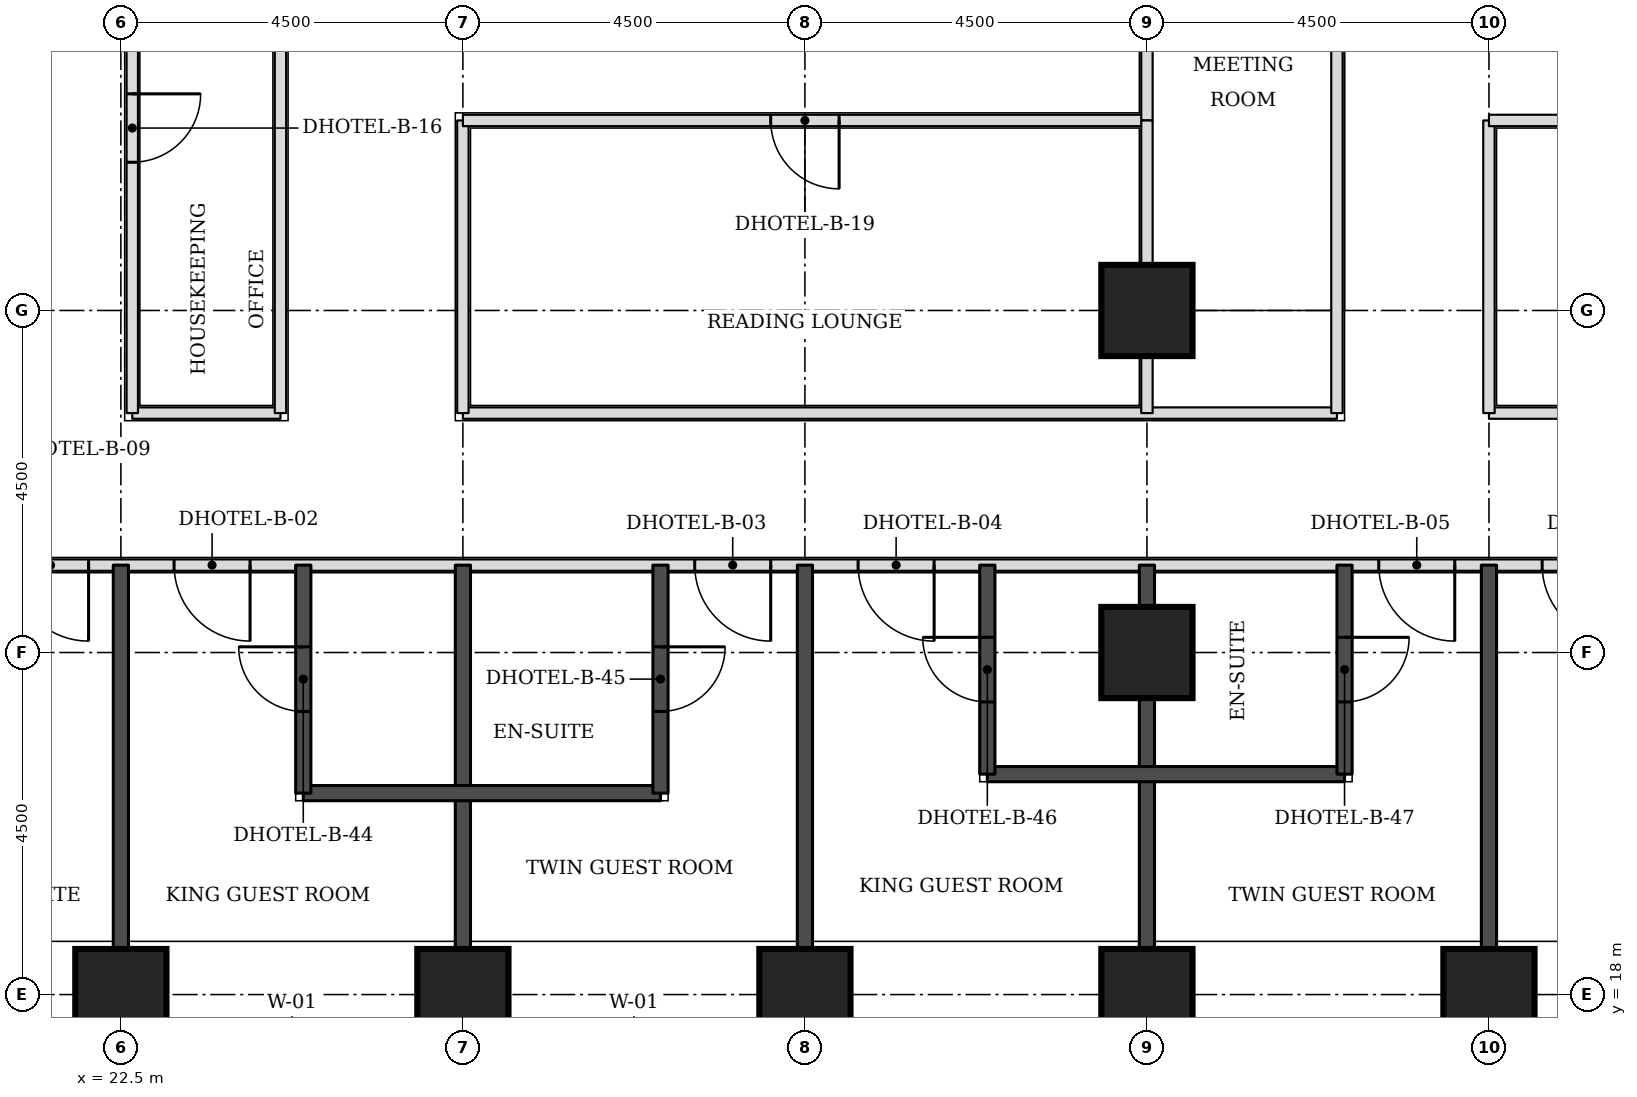
"""IFC4 building model, lengths in metres.
Left out: names, types, materials, properties, quantities, classifications, styles, units other than length and angle.
Written with IfcOpenShell. Run it as: python <this file> out.ifc"""

import sys

from ifc_helpers import new_model, si_unit, direction, frame, frame_2d, origin, origin_2d, place, context, subcontext, project, spatial, rectangle, extrude, element, fill, save


model = new_model("IFC4")
c1 = context("Model", 3, precision=1e-05, world=origin(), true_north=direction((0.0, 1.0)))
c2 = subcontext(c1, "Body", "Model", "MODEL_VIEW")
j1 = project(units=[si_unit("LENGTHUNIT", "METRE"), si_unit("PLANEANGLEUNIT", "RADIAN")], contexts=[c1])
p1 = place(None, origin())
s1 = spatial("IfcSite", under=j1, at=p1, CompositionType="ELEMENT")
p2 = place(p1, origin())
s2 = spatial("IfcBuilding", under=s1, at=p2, CompositionType="ELEMENT")
p3 = place(p2, frame((0.0, 0.0, 29.7)))
s3 = spatial("IfcBuildingStorey", under=s2, at=p3, CompositionType="ELEMENT", Elevation=29.7)
for number, where, z_axis, x_axis in (
    (1, (22.5, 18.0, 0.0), (0.0, 0.0, 1.0), (1.0, 0.0, 0.0)),
    (2, (27.0, 18.0, 0.0), (0.0, 0.0, 1.0), (1.0, 0.0, 0.0)),
    (3, (31.5, 18.0, 0.0), (0.0, 0.0, 1.0), (1.0, 0.0, 0.0)),
    (4, (36.0, 18.0, 0.0), (0.0, 0.0, 1.0), (1.0, 0.0, 0.0)),
    (5, (40.5, 18.0, 0.0), (0.0, 0.0, 1.0), (1.0, 0.0, 0.0)),
    (6, (36.0, 22.5, 0.0), (0.0, 0.0, 1.0), (1.0, 0.0, 0.0)),
    (7, (36.0, 27.0, 0.0), (0.0, 0.0, 1.0), (1.0, 0.0, 0.0)),
):
    element("IfcColumn", number, at=place(p3, frame(where, z_axis=z_axis, x_axis=x_axis)), inside=s3, PredefinedType="COLUMN", context=c2, shape_type="SweptSolid", body=[
        extrude(rectangle(XDim=1.2, YDim=1.2, at=origin_2d()), origin(), (0.0, 0.0, 1.0), 3.3),
    ])
p4 = place(p3, frame((20.65, 23.65, 0.0), z_axis=(0.0, 0.0, 1.0), x_axis=(1.0, 0.0, 0.0)))
e8 = element("IfcWall", 8, at=p4, inside=s3, PredefinedType="PARTITIONING", context=c2, shape_type="SweptSolid", body=[
    extrude(rectangle(XDim=32.2, YDim=0.15, at=frame_2d((16.1, 0.0))), origin(), (0.0, 0.0, 1.0), 3.08),
])
p5 = place(p4, frame((2.55, 0.0, 0.0)))
e9 = element("IfcOpeningElement", 9, at=p5, cuts=e8, PredefinedType="OPENING", context=c2, shape_type="SweptSolid", body=[
    extrude(rectangle(XDim=1.0, YDim=2.1, at=frame_2d((0.5, 1.05))), frame((0.0, 0.085, 0.0), z_axis=(0.0, -1.0, 0.0), x_axis=(1.0, 0.0, 0.0)), (0.0, 0.0, 1.0), 0.17),
])
p6 = place(p4, frame((9.4, 0.0, 0.0)))
e10 = element("IfcOpeningElement", 10, at=p6, cuts=e8, PredefinedType="OPENING", context=c2, shape_type="SweptSolid", body=[
    extrude(rectangle(XDim=1.0, YDim=2.1, at=frame_2d((0.5, 1.05))), frame((0.0, 0.085, 0.0), z_axis=(0.0, -1.0, 0.0), x_axis=(1.0, 0.0, 0.0)), (0.0, 0.0, 1.0), 0.17),
])
p7 = place(p4, frame((11.55, 0.0, 0.0)))
e11 = element("IfcOpeningElement", 11, at=p7, cuts=e8, PredefinedType="OPENING", context=c2, shape_type="SweptSolid", body=[
    extrude(rectangle(XDim=1.0, YDim=2.1, at=frame_2d((0.5, 1.05))), frame((0.0, 0.085, 0.0), z_axis=(0.0, -1.0, 0.0), x_axis=(1.0, 0.0, 0.0)), (0.0, 0.0, 1.0), 0.17),
])
p8 = place(p4, frame((18.4, 0.0, 0.0)))
e12 = element("IfcOpeningElement", 12, at=p8, cuts=e8, PredefinedType="OPENING", context=c2, shape_type="SweptSolid", body=[
    extrude(rectangle(XDim=1.0, YDim=2.1, at=frame_2d((0.5, 1.05))), frame((0.0, 0.085, 0.0), z_axis=(0.0, -1.0, 0.0), x_axis=(1.0, 0.0, 0.0)), (0.0, 0.0, 1.0), 0.17),
])
p9 = place(p4, frame((20.55, 0.0, 0.0)))
e13 = element("IfcOpeningElement", 13, at=p9, cuts=e8, PredefinedType="OPENING", context=c2, shape_type="SweptSolid", body=[
    extrude(rectangle(XDim=1.0, YDim=2.1, at=frame_2d((0.5, 1.05))), frame((0.0, 0.085, 0.0), z_axis=(0.0, -1.0, 0.0), x_axis=(1.0, 0.0, 0.0)), (0.0, 0.0, 1.0), 0.17),
])
p10 = place(p4, frame((27.4, 0.0, 0.0)))
e14 = element("IfcOpeningElement", 14, at=p10, cuts=e8, PredefinedType="OPENING", context=c2, shape_type="SweptSolid", body=[
    extrude(rectangle(XDim=1.0, YDim=2.1, at=frame_2d((0.5, 1.05))), frame((0.0, 0.085, 0.0), z_axis=(0.0, -1.0, 0.0), x_axis=(1.0, 0.0, 0.0)), (0.0, 0.0, 1.0), 0.17),
])
p11 = place(p4, frame((0.425, 0.0, 0.0)))
e15 = element("IfcOpeningElement", 15, at=p11, cuts=e8, PredefinedType="OPENING", context=c2, shape_type="SweptSolid", body=[
    extrude(rectangle(XDim=1.0, YDim=2.1, at=frame_2d((0.5, 1.05))), frame((0.0, 0.085, 0.0), z_axis=(0.0, -1.0, 0.0), x_axis=(1.0, 0.0, 0.0)), (0.0, 0.0, 1.0), 0.17),
])
p12 = place(p4, frame((30.025, 0.0, 0.0)))
e16 = element("IfcOpeningElement", 16, at=p12, cuts=e8, PredefinedType="OPENING", context=c2, shape_type="SweptSolid", body=[
    extrude(rectangle(XDim=1.0, YDim=2.1, at=frame_2d((0.5, 1.05))), frame((0.0, 0.085, 0.0), z_axis=(0.0, -1.0, 0.0), x_axis=(1.0, 0.0, 0.0)), (0.0, 0.0, 1.0), 0.17),
])
p13 = place(p3, frame((22.65, 25.65, 0.0), z_axis=(0.0, 0.0, 1.0), x_axis=(1.0, 0.0, 0.0)))
e17 = element("IfcWall", 17, at=p13, inside=s3, PredefinedType="PARTITIONING", context=c2, shape_type="SweptSolid", body=[
    extrude(rectangle(XDim=1.95, YDim=0.15, at=frame_2d((0.975, 0.0))), origin(), (0.0, 0.0, 1.0), 3.08),
])
p14 = place(p3, frame((22.65, 25.65, 0.0), z_axis=(0.0, 0.0, 1.0), x_axis=(0.0, 1.0, 0.0)))
e18 = element("IfcWall", 18, at=p14, inside=s3, PredefinedType="PARTITIONING", context=c2, shape_type="SweptSolid", body=[
    extrude(rectangle(XDim=17.35, YDim=0.15, at=frame_2d((8.675, 0.0))), origin(), (0.0, 0.0, 1.0), 3.08),
])
p15 = place(p14, frame((3.3, 0.0, 0.0)))
e19 = element("IfcOpeningElement", 19, at=p15, cuts=e18, PredefinedType="OPENING", context=c2, shape_type="SweptSolid", body=[
    extrude(rectangle(XDim=0.9, YDim=2.1, at=frame_2d((0.45, 1.05))), frame((0.0, 0.085, 0.0), z_axis=(0.0, -1.0, 0.0), x_axis=(1.0, 0.0, 0.0)), (0.0, 0.0, 1.0), 0.17),
])
p16 = place(p14, frame((10.725, 0.0, 0.0)))
e20 = element("IfcOpeningElement", 20, at=p16, cuts=e18, PredefinedType="OPENING", context=c2, shape_type="SweptSolid", body=[
    extrude(rectangle(XDim=0.9, YDim=2.1, at=frame_2d((0.45, 1.05))), frame((0.0, 0.085, 0.0), z_axis=(0.0, -1.0, 0.0), x_axis=(1.0, 0.0, 0.0)), (0.0, 0.0, 1.0), 0.17),
])
p17 = place(p3, frame((24.6, 25.65, 0.0), z_axis=(0.0, 0.0, 1.0), x_axis=(0.0, 1.0, 0.0)))
e21 = element("IfcWall", 21, at=p17, inside=s3, PredefinedType="PARTITIONING", context=c2, shape_type="SweptSolid", body=[
    extrude(rectangle(XDim=14.85, YDim=0.15, at=frame_2d((7.425, 0.0))), origin(), (0.0, 0.0, 1.0), 3.08),
])
p18 = place(p3, frame((27.0, 25.65, 0.0), z_axis=(0.0, 0.0, 1.0), x_axis=(1.0, 0.0, 0.0)))
e22 = element("IfcWall", 22, at=p18, inside=s3, PredefinedType="PARTITIONING", context=c2, shape_type="SweptSolid", body=[
    extrude(rectangle(XDim=11.5, YDim=0.15, at=frame_2d((5.75, 0.0))), origin(), (0.0, 0.0, 1.0), 3.08),
])
p19 = place(p3, frame((27.0, 25.65, 0.0), z_axis=(0.0, 0.0, 1.0), x_axis=(0.0, 1.0, 0.0)))
e23 = element("IfcWall", 23, at=p19, inside=s3, PredefinedType="PARTITIONING", context=c2, shape_type="SweptSolid", body=[
    extrude(rectangle(XDim=3.85, YDim=0.15, at=frame_2d((1.925, 0.0))), origin(), (0.0, 0.0, 1.0), 3.08),
])
p20 = place(p3, frame((38.5, 25.65, 0.0), z_axis=(0.0, 0.0, 1.0), x_axis=(0.0, 1.0, 0.0)))
e24 = element("IfcWall", 24, at=p20, inside=s3, PredefinedType="PARTITIONING", context=c2, shape_type="SweptSolid", body=[
    extrude(rectangle(XDim=14.85, YDim=0.15, at=frame_2d((7.425, 0.0))), origin(), (0.0, 0.0, 1.0), 3.08),
])
p21 = place(p20, frame((7.54, 0.0, 0.0)))
e25 = element("IfcOpeningElement", 25, at=p21, cuts=e24, PredefinedType="OPENING", context=c2, shape_type="SweptSolid", body=[
    extrude(rectangle(XDim=0.9, YDim=2.1, at=frame_2d((0.45, 1.05))), frame((0.0, 0.085, 0.0), z_axis=(0.0, -1.0, 0.0), x_axis=(1.0, 0.0, 0.0)), (0.0, 0.0, 1.0), 0.17),
])
p22 = place(p3, frame((40.5, 25.65, 0.0), z_axis=(0.0, 0.0, 1.0), x_axis=(1.0, 0.0, 0.0)))
e26 = element("IfcWall", 26, at=p22, inside=s3, PredefinedType="PARTITIONING", context=c2, shape_type="SweptSolid", body=[
    extrude(rectangle(XDim=10.35, YDim=0.15, at=frame_2d((5.175, 0.0))), origin(), (0.0, 0.0, 1.0), 3.08),
])
p23 = place(p3, frame((40.5, 25.65, 0.0), z_axis=(0.0, 0.0, 1.0), x_axis=(0.0, 1.0, 0.0)))
e27 = element("IfcWall", 27, at=p23, inside=s3, PredefinedType="PARTITIONING", context=c2, shape_type="SweptSolid", body=[
    extrude(rectangle(XDim=3.85, YDim=0.15, at=frame_2d((1.925, 0.0))), origin(), (0.0, 0.0, 1.0), 3.08),
])
p24 = place(p3, frame((27.0, 29.5, 0.0), z_axis=(0.0, 0.0, 1.0), x_axis=(1.0, 0.0, 0.0)))
e28 = element("IfcWall", 28, at=p24, inside=s3, PredefinedType="PARTITIONING", context=c2, shape_type="SweptSolid", body=[
    extrude(rectangle(XDim=9.0, YDim=0.15, at=frame_2d((4.5, 0.0))), origin(), (0.0, 0.0, 1.0), 3.08),
])
p25 = place(p24, frame((4.05, 0.0, 0.0)))
e29 = element("IfcOpeningElement", 29, at=p25, cuts=e28, PredefinedType="OPENING", context=c2, shape_type="SweptSolid", body=[
    extrude(rectangle(XDim=0.9, YDim=2.1, at=frame_2d((0.45, 1.05))), frame((0.0, 0.085, 0.0), z_axis=(0.0, -1.0, 0.0), x_axis=(1.0, 0.0, 0.0)), (0.0, 0.0, 1.0), 0.17),
])
p26 = place(p3, frame((36.0, 29.5, 0.0), z_axis=(0.0, 0.0, 1.0), x_axis=(0.0, 1.0, 0.0)))
e30 = element("IfcWall", 30, at=p26, inside=s3, PredefinedType="PARTITIONING", context=c2, shape_type="SweptSolid", body=[
    extrude(rectangle(XDim=1.95, YDim=0.15, at=frame_2d((0.975, 0.0))), origin(), (0.0, 0.0, 1.0), 2.33),
])
p27 = place(p3, frame((40.5, 29.5, 0.0), z_axis=(0.0, 0.0, 1.0), x_axis=(1.0, 0.0, 0.0)))
e31 = element("IfcWall", 31, at=p27, inside=s3, PredefinedType="PARTITIONING", context=c2, shape_type="SweptSolid", body=[
    extrude(rectangle(XDim=10.35, YDim=0.15, at=frame_2d((5.175, 0.0))), origin(), (0.0, 0.0, 1.0), 3.08),
])
p28 = place(p27, frame((4.725, 0.0, 0.0)))
e32 = element("IfcOpeningElement", 32, at=p28, cuts=e31, PredefinedType="OPENING", context=c2, shape_type="SweptSolid", body=[
    extrude(rectangle(XDim=0.9, YDim=2.1, at=frame_2d((0.45, 1.05))), frame((0.0, 0.085, 0.0), z_axis=(0.0, -1.0, 0.0), x_axis=(1.0, 0.0, 0.0)), (0.0, 0.0, 1.0), 0.17),
])
for number, where, z_axis, x_axis in (
    (33, (22.5, 18.6, 0.0), (0.0, 0.0, 1.0), (0.0, 1.0, 0.0)),
    (34, (27.0, 18.6, 0.0), (0.0, 0.0, 1.0), (0.0, 1.0, 0.0)),
    (35, (31.5, 18.6, 0.0), (0.0, 0.0, 1.0), (0.0, 1.0, 0.0)),
    (36, (36.0, 18.6, 0.0), (0.0, 0.0, 1.0), (0.0, 1.0, 0.0)),
    (37, (40.5, 18.6, 0.0), (0.0, 0.0, 1.0), (0.0, 1.0, 0.0)),
):
    element("IfcWall", number, at=place(p3, frame(where, z_axis=z_axis, x_axis=x_axis)), inside=s3, PredefinedType="SOLIDWALL", context=c2, shape_type="SweptSolid", body=[
        extrude(rectangle(XDim=5.05, YDim=0.2, at=frame_2d((2.525, 0.0))), origin(), (0.0, 0.0, 1.0), 3.08),
    ])
p29 = place(p3, frame((24.9, 20.65, 0.0), z_axis=(0.0, 0.0, 1.0), x_axis=(1.0, 0.0, 0.0)))
e38 = element("IfcWall", 38, at=p29, inside=s3, PredefinedType="SOLIDWALL", context=c2, shape_type="SweptSolid", body=[
    extrude(rectangle(XDim=4.7, YDim=0.2, at=frame_2d((2.35, 0.0))), origin(), (0.0, 0.0, 1.0), 3.08),
])
p30 = place(p3, frame((24.9, 20.65, 0.0), z_axis=(0.0, 0.0, 1.0), x_axis=(0.0, 1.0, 0.0)))
e39 = element("IfcWall", 39, at=p30, inside=s3, PredefinedType="SOLIDWALL", context=c2, shape_type="SweptSolid", body=[
    extrude(rectangle(XDim=3.0, YDim=0.2, at=frame_2d((1.5, 0.0))), origin(), (0.0, 0.0, 1.0), 3.08),
])
p31 = place(p30, frame((1.075, 0.0, 0.0)))
e40 = element("IfcOpeningElement", 40, at=p31, cuts=e39, PredefinedType="OPENING", context=c2, shape_type="SweptSolid", body=[
    extrude(rectangle(XDim=0.85, YDim=2.1, at=frame_2d((0.425, 1.05))), frame((0.0, 0.11, 0.0), z_axis=(0.0, -1.0, 0.0), x_axis=(1.0, 0.0, 0.0)), (0.0, 0.0, 1.0), 0.22),
])
p32 = place(p3, frame((29.6, 20.65, 0.0), z_axis=(0.0, 0.0, 1.0), x_axis=(0.0, 1.0, 0.0)))
e41 = element("IfcWall", 41, at=p32, inside=s3, PredefinedType="SOLIDWALL", context=c2, shape_type="SweptSolid", body=[
    extrude(rectangle(XDim=3.0, YDim=0.2, at=frame_2d((1.5, 0.0))), origin(), (0.0, 0.0, 1.0), 3.08),
])
p33 = place(p32, frame((1.075, 0.0, 0.0)))
e42 = element("IfcOpeningElement", 42, at=p33, cuts=e41, PredefinedType="OPENING", context=c2, shape_type="SweptSolid", body=[
    extrude(rectangle(XDim=0.85, YDim=2.1, at=frame_2d((0.425, 1.05))), frame((0.0, 0.11, 0.0), z_axis=(0.0, -1.0, 0.0), x_axis=(1.0, 0.0, 0.0)), (0.0, 0.0, 1.0), 0.22),
])
p34 = place(p3, frame((33.9, 20.9, 0.0), z_axis=(0.0, 0.0, 1.0), x_axis=(1.0, 0.0, 0.0)))
e43 = element("IfcWall", 43, at=p34, inside=s3, PredefinedType="SOLIDWALL", context=c2, shape_type="SweptSolid", body=[
    extrude(rectangle(XDim=4.7, YDim=0.2, at=frame_2d((2.35, 0.0))), origin(), (0.0, 0.0, 1.0), 3.08),
])
p35 = place(p3, frame((33.9, 20.9, 0.0), z_axis=(0.0, 0.0, 1.0), x_axis=(0.0, 1.0, 0.0)))
e44 = element("IfcWall", 44, at=p35, inside=s3, PredefinedType="SOLIDWALL", context=c2, shape_type="SweptSolid", body=[
    extrude(rectangle(XDim=2.75, YDim=0.2, at=frame_2d((1.375, 0.0))), origin(), (0.0, 0.0, 1.0), 3.08),
])
p36 = place(p35, frame((0.95, 0.0, 0.0)))
e45 = element("IfcOpeningElement", 45, at=p36, cuts=e44, PredefinedType="OPENING", context=c2, shape_type="SweptSolid", body=[
    extrude(rectangle(XDim=0.85, YDim=2.1, at=frame_2d((0.425, 1.05))), frame((0.0, 0.11, 0.0), z_axis=(0.0, -1.0, 0.0), x_axis=(1.0, 0.0, 0.0)), (0.0, 0.0, 1.0), 0.22),
])
p37 = place(p3, frame((38.6, 20.9, 0.0), z_axis=(0.0, 0.0, 1.0), x_axis=(0.0, 1.0, 0.0)))
e46 = element("IfcWall", 46, at=p37, inside=s3, PredefinedType="SOLIDWALL", context=c2, shape_type="SweptSolid", body=[
    extrude(rectangle(XDim=2.75, YDim=0.2, at=frame_2d((1.375, 0.0))), origin(), (0.0, 0.0, 1.0), 3.08),
])
p38 = place(p37, frame((0.95, 0.0, 0.0)))
e47 = element("IfcOpeningElement", 47, at=p38, cuts=e46, PredefinedType="OPENING", context=c2, shape_type="SweptSolid", body=[
    extrude(rectangle(XDim=0.85, YDim=2.1, at=frame_2d((0.425, 1.05))), frame((0.0, 0.11, 0.0), z_axis=(0.0, -1.0, 0.0), x_axis=(1.0, 0.0, 0.0)), (0.0, 0.0, 1.0), 0.22),
])
p39 = place(p3, frame((36.0, 25.65, 0.0), z_axis=(0.0, 0.0, 1.0), x_axis=(0.0, 1.0, 0.0)))
e48 = element("IfcWall", 48, at=p39, inside=s3, PredefinedType="PARTITIONING", context=c2, shape_type="SweptSolid", body=[
    extrude(rectangle(XDim=3.85, YDim=0.15, at=frame_2d((1.925, 0.0))), origin(), (0.0, 0.0, 1.0), 2.33),
])
p40 = place(p5, frame((1.0, 0.0, 0.0), z_axis=(0.0, 0.0, 1.0), x_axis=(-1.0, 0.0, 0.0)))
e49 = element("IfcDoor", 49, at=p40, inside=s3, OperationType="SINGLE_SWING_LEFT", PredefinedType="DOOR", context=c2, shape_type="SweptSolid", body=[
    extrude(rectangle(XDim=1.0, YDim=2.1, at=frame_2d((0.5, 1.05))), frame((0.0, 0.025, 0.0), z_axis=(0.0, -1.0, 0.0), x_axis=(1.0, 0.0, 0.0)), (0.0, 0.0, 1.0), 0.05),
])
fill(e9, e49)
p41 = place(p31, origin())
e50 = element("IfcDoor", 50, at=p41, inside=s3, OperationType="SINGLE_SWING_RIGHT", PredefinedType="DOOR", context=c2, shape_type="SweptSolid", body=[
    extrude(rectangle(XDim=0.85, YDim=2.1, at=frame_2d((0.425, 1.05))), frame((0.0, 0.025, 0.0), z_axis=(0.0, -1.0, 0.0), x_axis=(1.0, 0.0, 0.0)), (0.0, 0.0, 1.0), 0.05),
])
fill(e40, e50)
p42 = place(p6, frame((1.0, 0.0, 0.0), z_axis=(0.0, 0.0, 1.0), x_axis=(-1.0, 0.0, 0.0)))
e51 = element("IfcDoor", 51, at=p42, inside=s3, OperationType="SINGLE_SWING_LEFT", PredefinedType="DOOR", context=c2, shape_type="SweptSolid", body=[
    extrude(rectangle(XDim=1.0, YDim=2.1, at=frame_2d((0.5, 1.05))), frame((0.0, 0.025, 0.0), z_axis=(0.0, -1.0, 0.0), x_axis=(1.0, 0.0, 0.0)), (0.0, 0.0, 1.0), 0.05),
])
fill(e10, e51)
p43 = place(p33, frame((0.85, 0.0, 0.0), z_axis=(0.0, 0.0, 1.0), x_axis=(-1.0, 0.0, 0.0)))
e52 = element("IfcDoor", 52, at=p43, inside=s3, OperationType="SINGLE_SWING_LEFT", PredefinedType="DOOR", context=c2, shape_type="SweptSolid", body=[
    extrude(rectangle(XDim=0.85, YDim=2.1, at=frame_2d((0.425, 1.05))), frame((0.0, 0.025, 0.0), z_axis=(0.0, -1.0, 0.0), x_axis=(1.0, 0.0, 0.0)), (0.0, 0.0, 1.0), 0.05),
])
fill(e42, e52)
p44 = place(p7, frame((1.0, 0.0, 0.0), z_axis=(0.0, 0.0, 1.0), x_axis=(-1.0, 0.0, 0.0)))
e53 = element("IfcDoor", 53, at=p44, inside=s3, OperationType="SINGLE_SWING_LEFT", PredefinedType="DOOR", context=c2, shape_type="SweptSolid", body=[
    extrude(rectangle(XDim=1.0, YDim=2.1, at=frame_2d((0.5, 1.05))), frame((0.0, 0.025, 0.0), z_axis=(0.0, -1.0, 0.0), x_axis=(1.0, 0.0, 0.0)), (0.0, 0.0, 1.0), 0.05),
])
fill(e11, e53)
p45 = place(p36, origin())
e54 = element("IfcDoor", 54, at=p45, inside=s3, OperationType="SINGLE_SWING_RIGHT", PredefinedType="DOOR", context=c2, shape_type="SweptSolid", body=[
    extrude(rectangle(XDim=0.85, YDim=2.1, at=frame_2d((0.425, 1.05))), frame((0.0, 0.025, 0.0), z_axis=(0.0, -1.0, 0.0), x_axis=(1.0, 0.0, 0.0)), (0.0, 0.0, 1.0), 0.05),
])
fill(e45, e54)
p46 = place(p8, frame((1.0, 0.0, 0.0), z_axis=(0.0, 0.0, 1.0), x_axis=(-1.0, 0.0, 0.0)))
e55 = element("IfcDoor", 55, at=p46, inside=s3, OperationType="SINGLE_SWING_LEFT", PredefinedType="DOOR", context=c2, shape_type="SweptSolid", body=[
    extrude(rectangle(XDim=1.0, YDim=2.1, at=frame_2d((0.5, 1.05))), frame((0.0, 0.025, 0.0), z_axis=(0.0, -1.0, 0.0), x_axis=(1.0, 0.0, 0.0)), (0.0, 0.0, 1.0), 0.05),
])
fill(e12, e55)
p47 = place(p38, frame((0.85, 0.0, 0.0), z_axis=(0.0, 0.0, 1.0), x_axis=(-1.0, 0.0, 0.0)))
e56 = element("IfcDoor", 56, at=p47, inside=s3, OperationType="SINGLE_SWING_LEFT", PredefinedType="DOOR", context=c2, shape_type="SweptSolid", body=[
    extrude(rectangle(XDim=0.85, YDim=2.1, at=frame_2d((0.425, 1.05))), frame((0.0, 0.025, 0.0), z_axis=(0.0, -1.0, 0.0), x_axis=(1.0, 0.0, 0.0)), (0.0, 0.0, 1.0), 0.05),
])
fill(e47, e56)
p48 = place(p9, frame((1.0, 0.0, 0.0), z_axis=(0.0, 0.0, 1.0), x_axis=(-1.0, 0.0, 0.0)))
e57 = element("IfcDoor", 57, at=p48, inside=s3, OperationType="SINGLE_SWING_LEFT", PredefinedType="DOOR", context=c2, shape_type="SweptSolid", body=[
    extrude(rectangle(XDim=1.0, YDim=2.1, at=frame_2d((0.5, 1.05))), frame((0.0, 0.025, 0.0), z_axis=(0.0, -1.0, 0.0), x_axis=(1.0, 0.0, 0.0)), (0.0, 0.0, 1.0), 0.05),
])
fill(e13, e57)
p49 = place(p11, frame((1.0, 0.0, 0.0), z_axis=(0.0, 0.0, 1.0), x_axis=(-1.0, 0.0, 0.0)))
e58 = element("IfcDoor", 58, at=p49, inside=s3, OperationType="SINGLE_SWING_LEFT", PredefinedType="DOOR", context=c2, shape_type="SweptSolid", body=[
    extrude(rectangle(XDim=1.0, YDim=2.1, at=frame_2d((0.5, 1.05))), frame((0.0, 0.025, 0.0), z_axis=(0.0, -1.0, 0.0), x_axis=(1.0, 0.0, 0.0)), (0.0, 0.0, 1.0), 0.05),
])
fill(e15, e58)
p50 = place(p15, frame((0.9, 0.0, 0.0), z_axis=(0.0, 0.0, 1.0), x_axis=(-1.0, 0.0, 0.0)))
e59 = element("IfcDoor", 59, at=p50, inside=s3, OperationType="SINGLE_SWING_LEFT", PredefinedType="DOOR", context=c2, shape_type="SweptSolid", body=[
    extrude(rectangle(XDim=0.9, YDim=2.1, at=frame_2d((0.45, 1.05))), frame((0.0, 0.025, 0.0), z_axis=(0.0, -1.0, 0.0), x_axis=(1.0, 0.0, 0.0)), (0.0, 0.0, 1.0), 0.05),
])
fill(e19, e59)
p51 = place(p25, frame((0.9, 0.0, 0.0), z_axis=(0.0, 0.0, 1.0), x_axis=(-1.0, 0.0, 0.0)))
e60 = element("IfcDoor", 60, at=p51, inside=s3, OperationType="SINGLE_SWING_LEFT", PredefinedType="DOOR", context=c2, shape_type="SweptSolid", body=[
    extrude(rectangle(XDim=0.9, YDim=2.1, at=frame_2d((0.45, 1.05))), frame((0.0, 0.025, 0.0), z_axis=(0.0, -1.0, 0.0), x_axis=(1.0, 0.0, 0.0)), (0.0, 0.0, 1.0), 0.05),
])
fill(e29, e60)
save(model, sys.argv[1])
